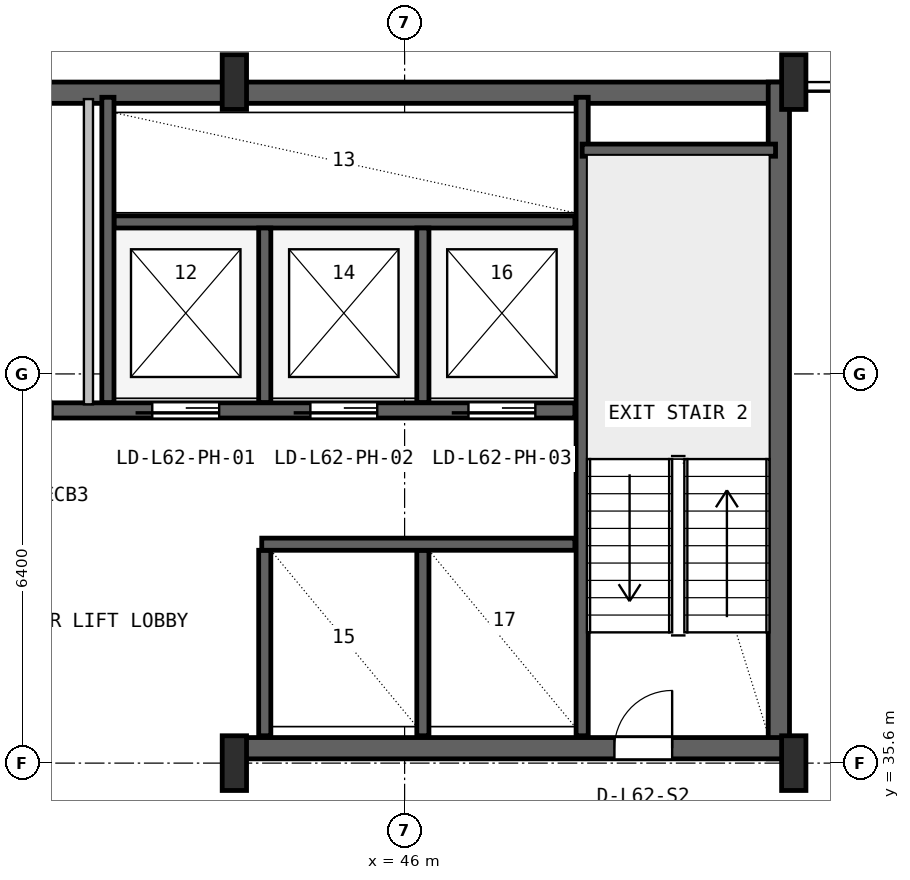
"""IFC4 building model, lengths in metres.
Left out: names, types, materials, properties, quantities, classifications, styles, units other than length and angle.
Written with IfcOpenShell. Run it as: python <this file> out.ifc"""

import sys

from ifc_helpers import new_model, si_unit, direction, frame, frame_2d, origin, origin_2d, place, context, subcontext, project, spatial, rectangle, i_section, extrude, source, transform, mapped, element, fill, save


model = new_model("IFC4")
c1 = context("Model", 3, precision=1e-05, world=origin(), true_north=direction((0.0, 1.0)))
c2 = subcontext(c1, "Body", "Model", "MODEL_VIEW")
j1 = project(units=[si_unit("LENGTHUNIT", "METRE"), si_unit("PLANEANGLEUNIT", "RADIAN")], contexts=[c1])
p1 = place(None, origin())
s1 = spatial("IfcSite", under=j1, at=p1, CompositionType="ELEMENT")
p2 = place(p1, origin())
s2 = spatial("IfcBuilding", under=s1, at=p2, CompositionType="ELEMENT")
p3 = place(p2, frame((0.0, 0.0, 250.8)))
s3 = spatial("IfcBuildingStorey", under=s2, at=p3, CompositionType="ELEMENT", Elevation=250.8)
p4 = place(p3, frame((15.6, 46.625, 0.0), z_axis=(0.0, 0.0, 1.0), x_axis=(1.0, 0.0, 0.0)))
e1 = element("IfcWall", 1, at=p4, inside=s3, PredefinedType="SHEAR", context=c2, shape_type="SweptSolid", body=[
    extrude(rectangle(XDim=36.8, YDim=0.35, at=frame_2d((18.4, 0.0))), origin(), (0.0, 0.0, 1.0), 3.55),
])
p5 = place(p3, frame((52.155, 35.67, 0.0), z_axis=(0.0, 0.0, 1.0), x_axis=(0.0, 1.0, 0.0)))
e2 = element("IfcWall", 2, at=p5, inside=s3, PredefinedType="SHEAR", context=c2, shape_type="SweptSolid", body=[
    extrude(rectangle(XDim=11.13, YDim=0.35, at=frame_2d((5.565, 0.0))), origin(), (0.0, 0.0, 1.0), 3.55),
])
p6 = place(p3, frame((43.2, 35.845, 0.0), z_axis=(0.0, 0.0, 1.0), x_axis=(1.0, 0.0, 0.0)))
e3 = element("IfcWall", 3, at=p6, inside=s3, PredefinedType="SHEAR", context=c2, shape_type="SweptSolid", body=[
    extrude(rectangle(XDim=9.13, YDim=0.35, at=frame_2d((4.565, 0.0))), origin(), (0.0, 0.0, 1.0), 3.55),
])
p7 = place(p6, frame((6.25, 0.0, 0.0)))
e4 = element("IfcOpeningElement", 4, at=p7, cuts=e3, PredefinedType="OPENING", context=c2, shape_type="SweptSolid", body=[
    extrude(rectangle(XDim=0.95, YDim=2.1, at=frame_2d((0.475, 1.05))), frame((0.0, 0.185, 0.0), z_axis=(0.0, -1.0, 0.0), x_axis=(1.0, 0.0, 0.0)), (0.0, 0.0, 1.0), 0.37),
])
m1 = source(origin(), c2, "Body", "SweptSolid", [
    extrude(i_section(OverallWidth=0.4, OverallDepth=0.9, WebThickness=0.016, FlangeThickness=0.028, FilletRadius=0.016, at=origin_2d()), origin(), (0.0, 0.0, 1.0), 3.8),
])
for number, where, z_axis, x_axis in (
    (5, (43.2, 35.6, 0.0), (0.0, 0.0, 1.0), (1.0, 0.0, 0.0)),
    (6, (43.2, 46.8, 0.0), (0.0, 0.0, 1.0), (1.0, 0.0, 0.0)),
    (7, (52.4, 35.6, 0.0), (0.0, 0.0, 1.0), (1.0, 0.0, 0.0)),
    (8, (52.4, 46.8, 0.0), (0.0, 0.0, 1.0), (1.0, 0.0, 0.0)),
):
    element("IfcColumn", number, at=place(p3, frame(where, z_axis=z_axis, x_axis=x_axis)), inside=s3, PredefinedType="COLUMN", context=c2, shape_type="MappedRepresentation", body=[
        mapped(m1, transform((0.0, 0.0, 0.0), x_axis=(1.0, 0.0, 0.0), y_axis=(0.0, 1.0, 0.0), z_axis=(0.0, 0.0, 1.0), scale=1.0)),
    ])
p8 = place(p3, frame((48.92, 36.05, 0.0), z_axis=(0.0, 0.0, 1.0), x_axis=(0.0, 1.0, 0.0)))
e9 = element("IfcWall", 9, at=p8, inside=s3, PredefinedType="SHEAR", context=c2, shape_type="SweptSolid", body=[
    extrude(rectangle(XDim=10.5, YDim=0.2, at=frame_2d((5.25, 0.0))), origin(), (0.0, 0.0, 1.0), 3.55),
])
p9 = place(p3, frame((48.92, 45.68, 0.0), z_axis=(0.0, 0.0, 1.0), x_axis=(1.0, 0.0, 0.0)))
e10 = element("IfcWall", 10, at=p9, inside=s3, PredefinedType="SHEAR", context=c2, shape_type="SweptSolid", body=[
    extrude(rectangle(XDim=3.18, YDim=0.2, at=frame_2d((1.59, 0.0))), origin(), (0.0, 0.0, 1.0), 3.55),
])
p10 = place(p3, frame((24.98, 41.4, 0.0), z_axis=(0.0, 0.0, 1.0), x_axis=(1.0, 0.0, 0.0)))
e11 = element("IfcWall", 11, at=p10, inside=s3, PredefinedType="SHEAR", context=c2, shape_type="SweptSolid", body=[
    extrude(rectangle(XDim=23.82, YDim=0.25, at=frame_2d((11.91, 0.0))), origin(), (0.0, 0.0, 1.0), 3.55),
])
p11 = place(p10, frame((16.87, 0.0, 0.0)))
e12 = element("IfcOpeningElement", 12, at=p11, cuts=e11, PredefinedType="OPENING", context=c2, shape_type="SweptSolid", body=[
    extrude(rectangle(XDim=1.1, YDim=2.18, at=frame_2d((0.55, 1.09))), frame((0.0, 0.135, 0.0), z_axis=(0.0, -1.0, 0.0), x_axis=(1.0, 0.0, 0.0)), (0.0, 0.0, 1.0), 0.27),
])
p12 = place(p10, frame((19.47, 0.0, 0.0)))
e13 = element("IfcOpeningElement", 13, at=p12, cuts=e11, PredefinedType="OPENING", context=c2, shape_type="SweptSolid", body=[
    extrude(rectangle(XDim=1.1, YDim=2.18, at=frame_2d((0.55, 1.09))), frame((0.0, 0.135, 0.0), z_axis=(0.0, -1.0, 0.0), x_axis=(1.0, 0.0, 0.0)), (0.0, 0.0, 1.0), 0.27),
])
p13 = place(p10, frame((22.07, 0.0, 0.0)))
e14 = element("IfcOpeningElement", 14, at=p13, cuts=e11, PredefinedType="OPENING", context=c2, shape_type="SweptSolid", body=[
    extrude(rectangle(XDim=1.1, YDim=2.18, at=frame_2d((0.55, 1.09))), frame((0.0, 0.135, 0.0), z_axis=(0.0, -1.0, 0.0), x_axis=(1.0, 0.0, 0.0)), (0.0, 0.0, 1.0), 0.27),
])
p14 = place(p10, frame((1.81, 0.0, 0.0)))
e15 = element("IfcOpeningElement", 15, at=p14, cuts=e11, PredefinedType="OPENING", context=c2, shape_type="SweptSolid", body=[
    extrude(rectangle(XDim=0.92, YDim=2.08, at=frame_2d((0.46, 1.04))), frame((0.0, 0.135, 0.0), z_axis=(0.0, -1.0, 0.0), x_axis=(1.0, 0.0, 0.0)), (0.0, 0.0, 1.0), 0.27),
])
p15 = place(p10, frame((5.71, 0.0, 0.0)))
e16 = element("IfcOpeningElement", 16, at=p15, cuts=e11, PredefinedType="OPENING", context=c2, shape_type="SweptSolid", body=[
    extrude(rectangle(XDim=0.92, YDim=2.08, at=frame_2d((0.46, 1.04))), frame((0.0, 0.135, 0.0), z_axis=(0.0, -1.0, 0.0), x_axis=(1.0, 0.0, 0.0)), (0.0, 0.0, 1.0), 0.27),
])
p16 = place(p10, frame((9.21, 0.0, 0.0)))
e17 = element("IfcOpeningElement", 17, at=p16, cuts=e11, PredefinedType="OPENING", context=c2, shape_type="SweptSolid", body=[
    extrude(rectangle(XDim=0.92, YDim=2.08, at=frame_2d((0.46, 1.04))), frame((0.0, 0.135, 0.0), z_axis=(0.0, -1.0, 0.0), x_axis=(1.0, 0.0, 0.0)), (0.0, 0.0, 1.0), 0.27),
])
p17 = place(p10, frame((11.96, 0.0, 0.0)))
e18 = element("IfcOpeningElement", 18, at=p17, cuts=e11, PredefinedType="OPENING", context=c2, shape_type="SweptSolid", body=[
    extrude(rectangle(XDim=0.92, YDim=2.08, at=frame_2d((0.46, 1.04))), frame((0.0, 0.135, 0.0), z_axis=(0.0, -1.0, 0.0), x_axis=(1.0, 0.0, 0.0)), (0.0, 0.0, 1.0), 0.27),
])
p18 = place(p10, frame((14.31, 0.0, 0.0)))
e19 = element("IfcOpeningElement", 19, at=p18, cuts=e11, PredefinedType="OPENING", context=c2, shape_type="SweptSolid", body=[
    extrude(rectangle(XDim=0.92, YDim=2.08, at=frame_2d((0.46, 1.04))), frame((0.0, 0.135, 0.0), z_axis=(0.0, -1.0, 0.0), x_axis=(1.0, 0.0, 0.0)), (0.0, 0.0, 1.0), 0.27),
])
p19 = place(p3, frame((41.22, 44.5, 0.0), z_axis=(0.0, 0.0, 1.0), x_axis=(1.0, 0.0, 0.0)))
e20 = element("IfcWall", 20, at=p19, inside=s3, PredefinedType="SHEAR", context=c2, shape_type="SweptSolid", body=[
    extrude(rectangle(XDim=7.58, YDim=0.2, at=frame_2d((3.79, 0.0))), origin(), (0.0, 0.0, 1.0), 3.55),
])
p20 = place(p3, frame((41.12, 41.53, 0.0), z_axis=(0.0, 0.0, 1.0), x_axis=(0.0, 1.0, 0.0)))
e21 = element("IfcWall", 21, at=p20, inside=s3, PredefinedType="SHEAR", context=c2, shape_type="SweptSolid", body=[
    extrude(rectangle(XDim=5.02, YDim=0.2, at=frame_2d((2.51, 0.0))), origin(), (0.0, 0.0, 1.0), 3.55),
])
for number, where, z_axis, x_axis in (
    (22, (43.7, 41.53, 0.0), (0.0, 0.0, 1.0), (0.0, 1.0, 0.0)),
    (23, (46.3, 41.53, 0.0), (0.0, 0.0, 1.0), (0.0, 1.0, 0.0)),
):
    element("IfcWall", number, at=place(p3, frame(where, z_axis=z_axis, x_axis=x_axis)), inside=s3, PredefinedType="SHEAR", context=c2, shape_type="SweptSolid", body=[
        extrude(rectangle(XDim=2.87, YDim=0.2, at=frame_2d((1.435, 0.0))), origin(), (0.0, 0.0, 1.0), 3.55),
    ])
for number, where, z_axis, x_axis in (
    (24, (43.7, 36.05, 0.0), (0.0, 0.0, 1.0), (0.0, 1.0, 0.0)),
    (25, (46.3, 36.05, 0.0), (0.0, 0.0, 1.0), (0.0, 1.0, 0.0)),
):
    element("IfcWall", number, at=place(p3, frame(where, z_axis=z_axis, x_axis=x_axis)), inside=s3, PredefinedType="SHEAR", context=c2, shape_type="SweptSolid", body=[
        extrude(rectangle(XDim=3.05, YDim=0.2, at=frame_2d((1.525, 0.0))), origin(), (0.0, 0.0, 1.0), 3.55),
    ])
p21 = place(p3, frame((43.65, 39.2, 0.0), z_axis=(0.0, 0.0, 1.0), x_axis=(1.0, 0.0, 0.0)))
e26 = element("IfcWall", 26, at=p21, inside=s3, PredefinedType="SHEAR", context=c2, shape_type="SweptSolid", body=[
    extrude(rectangle(XDim=5.15, YDim=0.2, at=frame_2d((2.575, 0.0))), origin(), (0.0, 0.0, 1.0), 3.55),
])
p22 = place(p3, frame((40.8, 41.5, 0.0), z_axis=(0.0, 0.0, 1.0), x_axis=(0.0, 1.0, 0.0)))
e27 = element("IfcWall", 27, at=p22, inside=s3, PredefinedType="PARTITIONING", context=c2, shape_type="SweptSolid", body=[
    extrude(rectangle(XDim=5.02, YDim=0.15, at=frame_2d((2.51, 0.0))), origin(), (0.0, 0.0, 1.0), 3.53),
])
m2 = source(origin(), c2, "Body", "SweptSolid", [
    extrude(rectangle(XDim=0.95, YDim=2.1, at=frame_2d((0.475, 1.05))), frame((0.0, 0.025, 0.0), z_axis=(0.0, -1.0, 0.0), x_axis=(1.0, 0.0, 0.0)), (0.0, 0.0, 1.0), 0.05),
])
p23 = place(p7, origin())
e28 = element("IfcDoor", 28, at=p23, inside=s3, OperationType="SINGLE_SWING_RIGHT", PredefinedType="DOOR", context=c2, shape_type="MappedRepresentation", body=[
    mapped(m2, transform((0.0, 0.0, 0.0), x_axis=(1.0, 0.0, 0.0), y_axis=(0.0, 1.0, 0.0), z_axis=(0.0, 0.0, 1.0), scale=1.0)),
])
fill(e4, e28)
m3 = source(origin(), c2, "Body", "SweptSolid", [
    extrude(rectangle(XDim=1.1, YDim=2.18, at=frame_2d((0.55, 1.09))), frame((0.0, 0.025, 0.0), z_axis=(0.0, -1.0, 0.0), x_axis=(1.0, 0.0, 0.0)), (0.0, 0.0, 1.0), 0.05),
])
p24 = place(p11, frame((1.1, 0.0, 0.0), z_axis=(0.0, 0.0, 1.0), x_axis=(-1.0, 0.0, 0.0)))
e29 = element("IfcDoor", 29, at=p24, inside=s3, OperationType="SLIDING_TO_LEFT", PredefinedType="DOOR", context=c2, shape_type="MappedRepresentation", body=[
    mapped(m3, transform((0.0, 0.0, 0.0), x_axis=(1.0, 0.0, 0.0), y_axis=(0.0, 1.0, 0.0), z_axis=(0.0, 0.0, 1.0), scale=1.0)),
])
fill(e12, e29)
p25 = place(p12, frame((1.1, 0.0, 0.0), z_axis=(0.0, 0.0, 1.0), x_axis=(-1.0, 0.0, 0.0)))
e30 = element("IfcDoor", 30, at=p25, inside=s3, OperationType="SLIDING_TO_LEFT", PredefinedType="DOOR", context=c2, shape_type="MappedRepresentation", body=[
    mapped(m3, transform((0.0, 0.0, 0.0), x_axis=(1.0, 0.0, 0.0), y_axis=(0.0, 1.0, 0.0), z_axis=(0.0, 0.0, 1.0), scale=1.0)),
])
fill(e13, e30)
p26 = place(p13, frame((1.1, 0.0, 0.0), z_axis=(0.0, 0.0, 1.0), x_axis=(-1.0, 0.0, 0.0)))
e31 = element("IfcDoor", 31, at=p26, inside=s3, OperationType="SLIDING_TO_LEFT", PredefinedType="DOOR", context=c2, shape_type="MappedRepresentation", body=[
    mapped(m3, transform((0.0, 0.0, 0.0), x_axis=(1.0, 0.0, 0.0), y_axis=(0.0, 1.0, 0.0), z_axis=(0.0, 0.0, 1.0), scale=1.0)),
])
fill(e14, e31)
m4 = source(origin(), c2, "Body", "SweptSolid", [
    extrude(rectangle(XDim=0.92, YDim=2.08, at=frame_2d((0.46, 1.04))), frame((0.0, 0.025, 0.0), z_axis=(0.0, -1.0, 0.0), x_axis=(1.0, 0.0, 0.0)), (0.0, 0.0, 1.0), 0.05),
])
p27 = place(p18, origin())
e32 = element("IfcDoor", 32, at=p27, inside=s3, OperationType="SINGLE_SWING_LEFT", PredefinedType="DOOR", context=c2, shape_type="MappedRepresentation", body=[
    mapped(m4, transform((0.0, 0.0, 0.0), x_axis=(1.0, 0.0, 0.0), y_axis=(0.0, 1.0, 0.0), z_axis=(0.0, 0.0, 1.0), scale=1.0)),
])
fill(e19, e32)
save(model, sys.argv[1])
